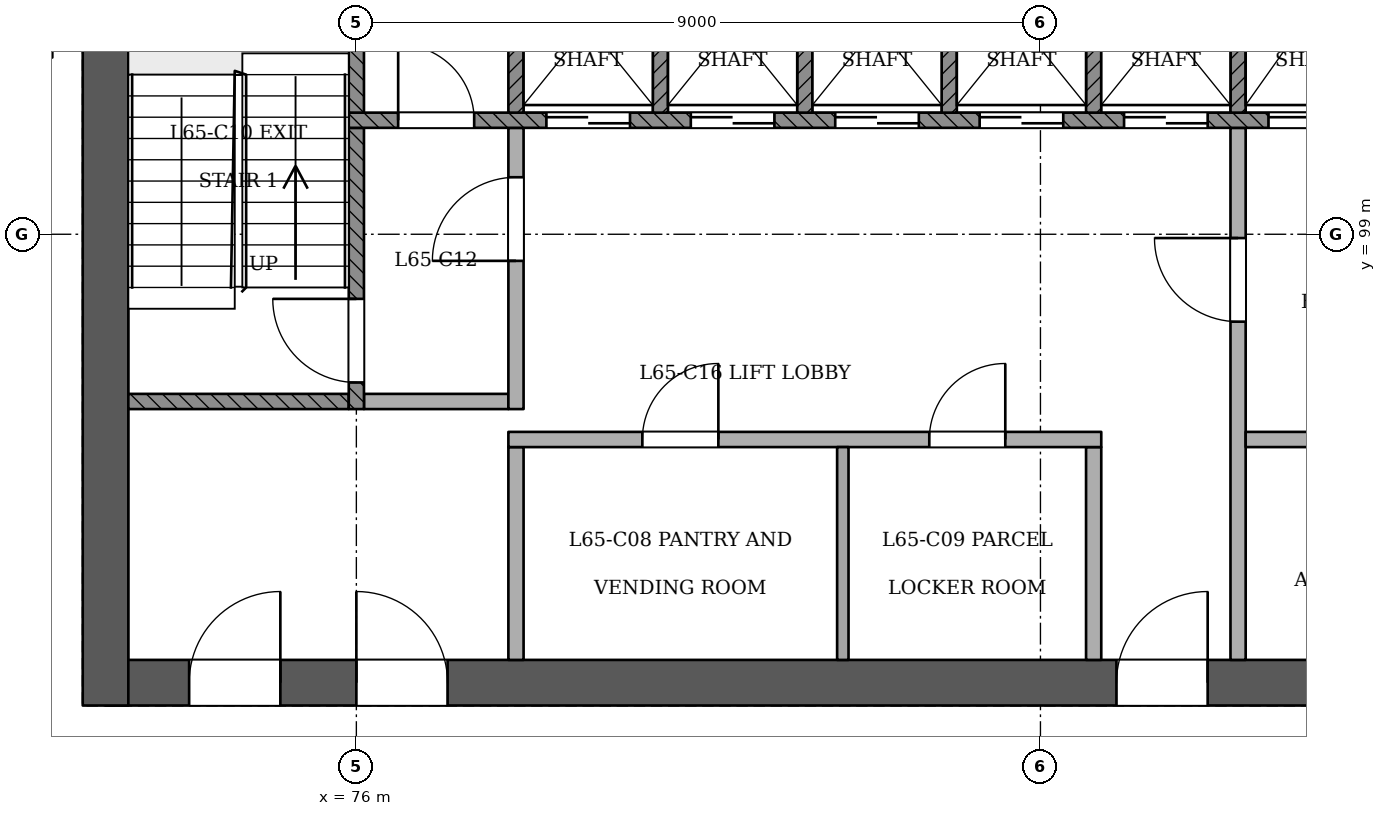
"""IFC4 building model, lengths in metres.
Left out: names, types, materials, properties, quantities, classifications, styles, units other than length and angle.
Written with IfcOpenShell. Run it as: python <this file> out.ifc"""

import sys

from ifc_helpers import new_model, si_unit, direction, frame, frame_2d, origin, place, context, subcontext, project, spatial, rectangle, extrude, element, fill, save


model = new_model("IFC4")
c1 = context("Model", 3, precision=1e-05, world=origin(), true_north=direction((0.0, 1.0)))
c2 = subcontext(c1, "Body", "Model", "MODEL_VIEW")
j1 = project(units=[si_unit("LENGTHUNIT", "METRE"), si_unit("PLANEANGLEUNIT", "RADIAN")], contexts=[c1])
p1 = place(None, origin())
s1 = spatial("IfcSite", under=j1, at=p1, CompositionType="ELEMENT")
p2 = place(p1, origin())
s2 = spatial("IfcBuilding", under=s1, at=p2, CompositionType="ELEMENT")
p3 = place(p2, frame((0.0, 0.0, 253.6)))
s3 = spatial("IfcBuildingStorey", under=s2, at=p3, CompositionType="ELEMENT", Elevation=253.6)
p4 = place(p3, frame((72.7, 93.1, 0.0), z_axis=(0.0, 0.0, 1.0), x_axis=(1.0, 0.0, 0.0)))
e1 = element("IfcWall", 1, at=p4, inside=s3, PredefinedType="SHEAR", context=c2, shape_type="SweptSolid", body=[
    extrude(rectangle(XDim=24.9, YDim=0.6, at=frame_2d((12.45, 0.0))), origin(), (0.0, 0.0, 1.0), 3.6),
])
p5 = place(p4, frame((1.1, 0.0, 0.0)))
e2 = element("IfcOpeningElement", 2, at=p5, cuts=e1, PredefinedType="OPENING", context=c2, shape_type="SweptSolid", body=[
    extrude(rectangle(XDim=1.2, YDim=2.1, at=frame_2d((0.6, 1.05))), frame((0.0, 0.311, 0.0), z_axis=(0.0, -1.0, 0.0), x_axis=(1.0, 0.0, 0.0)), (0.0, 0.0, 1.0), 0.621),
])
p6 = place(p4, frame((3.3, 0.0, 0.0)))
e3 = element("IfcOpeningElement", 3, at=p6, cuts=e1, PredefinedType="OPENING", context=c2, shape_type="SweptSolid", body=[
    extrude(rectangle(XDim=1.2, YDim=2.1, at=frame_2d((0.6, 1.05))), frame((0.0, 0.311, 0.0), z_axis=(0.0, -1.0, 0.0), x_axis=(1.0, 0.0, 0.0)), (0.0, 0.0, 1.0), 0.621),
])
p7 = place(p4, frame((13.3, 0.0, 0.0)))
e4 = element("IfcOpeningElement", 4, at=p7, cuts=e1, PredefinedType="OPENING", context=c2, shape_type="SweptSolid", body=[
    extrude(rectangle(XDim=1.2, YDim=2.1, at=frame_2d((0.6, 1.05))), frame((0.0, 0.311, 0.0), z_axis=(0.0, -1.0, 0.0), x_axis=(1.0, 0.0, 0.0)), (0.0, 0.0, 1.0), 0.621),
])
p8 = place(p4, frame((16.012, 0.0, 0.0)))
e5 = element("IfcOpeningElement", 5, at=p8, cuts=e1, PredefinedType="OPENING", context=c2, shape_type="SweptSolid", body=[
    extrude(rectangle(XDim=1.0, YDim=2.1, at=frame_2d((0.5, 1.05))), frame((0.0, 0.311, 0.0), z_axis=(0.0, -1.0, 0.0), x_axis=(1.0, 0.0, 0.0)), (0.0, 0.0, 1.0), 0.621),
])
p9 = place(p4, frame((19.9, 0.0, 0.0)))
e6 = element("IfcOpeningElement", 6, at=p9, cuts=e1, PredefinedType="OPENING", context=c2, shape_type="SweptSolid", body=[
    extrude(rectangle(XDim=1.0, YDim=2.1, at=frame_2d((0.5, 1.05))), frame((0.0, 0.311, 0.0), z_axis=(0.0, -1.0, 0.0), x_axis=(1.0, 0.0, 0.0)), (0.0, 0.0, 1.0), 0.621),
])
p10 = place(p4, frame((23.038, 0.0, 0.0)))
e7 = element("IfcOpeningElement", 7, at=p10, cuts=e1, PredefinedType="OPENING", context=c2, shape_type="SweptSolid", body=[
    extrude(rectangle(XDim=1.0, YDim=2.1, at=frame_2d((0.5, 1.05))), frame((0.0, 0.311, 0.0), z_axis=(0.0, -1.0, 0.0), x_axis=(1.0, 0.0, 0.0)), (0.0, 0.0, 1.0), 0.621),
])
p11 = place(p3, frame((72.7, 103.7, 0.0), z_axis=(0.0, 0.0, 1.0), x_axis=(0.0, -1.0, 0.0)))
e8 = element("IfcWall", 8, at=p11, inside=s3, PredefinedType="SHEAR", context=c2, shape_type="SweptSolid", body=[
    extrude(rectangle(XDim=10.9, YDim=0.6, at=frame_2d((5.45, 0.0))), origin(), (0.0, 0.0, 1.0), 3.6),
])
p12 = place(p3, frame((72.0, 101.4, 0.0), z_axis=(0.0, 0.0, 1.0), x_axis=(-1.0, 0.0, 0.0)))
e9 = element("IfcWall", 9, at=p12, inside=s3, PredefinedType="PARTITIONING", context=c2, shape_type="SweptSolid", body=[
    extrude(rectangle(XDim=1.8, YDim=0.15, at=frame_2d((0.9, 0.0))), origin(), (0.0, 0.0, 1.0), 3.2),
])
p13 = place(p12, frame((0.54, 0.0, 0.0)))
e10 = element("IfcOpeningElement", 10, at=p13, cuts=e9, PredefinedType="OPENING", context=c2, shape_type="SweptSolid", body=[
    extrude(rectangle(XDim=1.0, YDim=2.1, at=frame_2d((0.5, 1.05))), frame((0.0, 0.085, 0.0), z_axis=(0.0, -1.0, 0.0), x_axis=(1.0, 0.0, 0.0)), (0.0, 0.0, 1.0), 0.171),
])
p14 = place(p3, frame((78.1, 93.4, 0.0), z_axis=(0.0, 0.0, 1.0), x_axis=(0.0, 1.0, 0.0)))
e11 = element("IfcWall", 11, at=p14, inside=s3, PredefinedType="PARTITIONING", context=c2, shape_type="SweptSolid", body=[
    extrude(rectangle(XDim=2.8, YDim=0.2, at=frame_2d((1.4, 0.0))), origin(), (0.0, 0.0, 1.0), 3.2),
])
p15 = place(p3, frame((82.4, 93.4, 0.0), z_axis=(0.0, 0.0, 1.0), x_axis=(0.0, 1.0, 0.0)))
e12 = element("IfcWall", 12, at=p15, inside=s3, PredefinedType="PARTITIONING", context=c2, shape_type="SweptSolid", body=[
    extrude(rectangle(XDim=2.8, YDim=0.15, at=frame_2d((1.4, 0.0))), origin(), (0.0, 0.0, 1.0), 3.2),
])
p16 = place(p3, frame((85.7, 93.4, 0.0), z_axis=(0.0, 0.0, 1.0), x_axis=(0.0, 1.0, 0.0)))
e13 = element("IfcWall", 13, at=p16, inside=s3, PredefinedType="PARTITIONING", context=c2, shape_type="SweptSolid", body=[
    extrude(rectangle(XDim=2.8, YDim=0.2, at=frame_2d((1.4, 0.0))), origin(), (0.0, 0.0, 1.0), 3.2),
])
p17 = place(p3, frame((87.6, 93.4, 0.0), z_axis=(0.0, 0.0, 1.0), x_axis=(0.0, 1.0, 0.0)))
e14 = element("IfcWall", 14, at=p17, inside=s3, PredefinedType="PARTITIONING", context=c2, shape_type="SweptSolid", body=[
    extrude(rectangle(XDim=7.0, YDim=0.2, at=frame_2d((3.5, 0.0))), origin(), (0.0, 0.0, 1.0), 3.2),
])
p18 = place(p17, frame((4.45, 0.0, 0.0)))
e15 = element("IfcOpeningElement", 15, at=p18, cuts=e14, PredefinedType="OPENING", context=c2, shape_type="SweptSolid", body=[
    extrude(rectangle(XDim=1.1, YDim=2.1, at=frame_2d((0.55, 1.05))), frame((0.0, 0.11, 0.0), z_axis=(0.0, -1.0, 0.0), x_axis=(1.0, 0.0, 0.0)), (0.0, 0.0, 1.0), 0.221),
])
p19 = place(p3, frame((78.0, 96.3, 0.0), z_axis=(0.0, 0.0, 1.0), x_axis=(1.0, 0.0, 0.0)))
e16 = element("IfcWall", 16, at=p19, inside=s3, PredefinedType="PARTITIONING", context=c2, shape_type="SweptSolid", body=[
    extrude(rectangle(XDim=7.8, YDim=0.2, at=frame_2d((3.9, 0.0))), origin(), (0.0, 0.0, 1.0), 3.2),
])
p20 = place(p19, frame((1.762, 0.0, 0.0)))
e17 = element("IfcOpeningElement", 17, at=p20, cuts=e16, PredefinedType="OPENING", context=c2, shape_type="SweptSolid", body=[
    extrude(rectangle(XDim=1.0, YDim=2.1, at=frame_2d((0.5, 1.05))), frame((0.0, 0.11, 0.0), z_axis=(0.0, -1.0, 0.0), x_axis=(1.0, 0.0, 0.0)), (0.0, 0.0, 1.0), 0.221),
])
p21 = place(p19, frame((5.538, 0.0, 0.0)))
e18 = element("IfcOpeningElement", 18, at=p21, cuts=e16, PredefinedType="OPENING", context=c2, shape_type="SweptSolid", body=[
    extrude(rectangle(XDim=1.0, YDim=2.1, at=frame_2d((0.5, 1.05))), frame((0.0, 0.11, 0.0), z_axis=(0.0, -1.0, 0.0), x_axis=(1.0, 0.0, 0.0)), (0.0, 0.0, 1.0), 0.221),
])
p22 = place(p3, frame((87.7, 96.3, 0.0), z_axis=(0.0, 0.0, 1.0), x_axis=(1.0, 0.0, 0.0)))
e19 = element("IfcWall", 19, at=p22, inside=s3, PredefinedType="PARTITIONING", context=c2, shape_type="SweptSolid", body=[
    extrude(rectangle(XDim=3.6, YDim=0.2, at=frame_2d((1.8, 0.0))), origin(), (0.0, 0.0, 1.0), 3.2),
])
p23 = place(p3, frame((73.0, 96.8, 0.0), z_axis=(0.0, 0.0, 1.0), x_axis=(1.0, 0.0, 0.0)))
e20 = element("IfcWall", 20, at=p23, inside=s3, PredefinedType="SOLIDWALL", context=c2, shape_type="SweptSolid", body=[
    extrude(rectangle(XDim=2.9, YDim=0.2, at=frame_2d((1.45, 0.0))), origin(), (0.0, 0.0, 1.0), 3.2),
])
p24 = place(p3, frame((76.0, 96.7, 0.0), z_axis=(0.0, 0.0, 1.0), x_axis=(0.0, 1.0, 0.0)))
e21 = element("IfcWall", 21, at=p24, inside=s3, PredefinedType="SOLIDWALL", context=c2, shape_type="SweptSolid", body=[
    extrude(rectangle(XDim=3.7, YDim=0.2, at=frame_2d((1.85, 0.0))), origin(), (0.0, 0.0, 1.0), 3.2),
])
p25 = place(p24, frame((0.35, 0.0, 0.0)))
e22 = element("IfcOpeningElement", 22, at=p25, cuts=e21, PredefinedType="OPENING", context=c2, shape_type="SweptSolid", body=[
    extrude(rectangle(XDim=1.1, YDim=2.1, at=frame_2d((0.55, 1.05))), frame((0.0, 0.11, 0.0), z_axis=(0.0, -1.0, 0.0), x_axis=(1.0, 0.0, 0.0)), (0.0, 0.0, 1.0), 0.221),
])
p26 = place(p3, frame((76.1, 96.8, 0.0), z_axis=(0.0, 0.0, 1.0), x_axis=(1.0, 0.0, 0.0)))
e23 = element("IfcWall", 23, at=p26, inside=s3, PredefinedType="PARTITIONING", context=c2, shape_type="SweptSolid", body=[
    extrude(rectangle(XDim=1.9, YDim=0.2, at=frame_2d((0.95, 0.0))), origin(), (0.0, 0.0, 1.0), 3.2),
])
p27 = place(p3, frame((78.1, 96.7, 0.0), z_axis=(0.0, 0.0, 1.0), x_axis=(0.0, 1.0, 0.0)))
e24 = element("IfcWall", 24, at=p27, inside=s3, PredefinedType="PARTITIONING", context=c2, shape_type="SweptSolid", body=[
    extrude(rectangle(XDim=3.7, YDim=0.2, at=frame_2d((1.85, 0.0))), origin(), (0.0, 0.0, 1.0), 3.2),
])
p28 = place(p27, frame((1.95, 0.0, 0.0)))
e25 = element("IfcOpeningElement", 25, at=p28, cuts=e24, PredefinedType="OPENING", context=c2, shape_type="SweptSolid", body=[
    extrude(rectangle(XDim=1.1, YDim=2.1, at=frame_2d((0.55, 1.05))), frame((0.0, 0.11, 0.0), z_axis=(0.0, -1.0, 0.0), x_axis=(1.0, 0.0, 0.0)), (0.0, 0.0, 1.0), 0.221),
])
p29 = place(p3, frame((75.9, 100.5, 0.0), z_axis=(0.0, 0.0, 1.0), x_axis=(1.0, 0.0, 0.0)))
e26 = element("IfcWall", 26, at=p29, inside=s3, PredefinedType="SOLIDWALL", context=c2, shape_type="SweptSolid", body=[
    extrude(rectangle(XDim=18.2, YDim=0.2, at=frame_2d((9.1, 0.0))), origin(), (0.0, 0.0, 1.0), 3.2),
])
p30 = place(p29, frame((2.6, 0.0, 0.0)))
e27 = element("IfcOpeningElement", 27, at=p30, cuts=e26, PredefinedType="OPENING", context=c2, shape_type="SweptSolid", body=[
    extrude(rectangle(XDim=1.1, YDim=2.1, at=frame_2d((0.55, 1.05))), frame((0.0, 0.11, 0.0), z_axis=(0.0, -1.0, 0.0), x_axis=(1.0, 0.0, 0.0)), (0.0, 0.0, 1.0), 0.221),
])
p31 = place(p29, frame((4.5, 0.0, 0.0)))
e28 = element("IfcOpeningElement", 28, at=p31, cuts=e26, PredefinedType="OPENING", context=c2, shape_type="SweptSolid", body=[
    extrude(rectangle(XDim=1.1, YDim=2.1, at=frame_2d((0.55, 1.05))), frame((0.0, 0.11, 0.0), z_axis=(0.0, -1.0, 0.0), x_axis=(1.0, 0.0, 0.0)), (0.0, 0.0, 1.0), 0.221),
])
p32 = place(p29, frame((6.4, 0.0, 0.0)))
e29 = element("IfcOpeningElement", 29, at=p32, cuts=e26, PredefinedType="OPENING", context=c2, shape_type="SweptSolid", body=[
    extrude(rectangle(XDim=1.1, YDim=2.1, at=frame_2d((0.55, 1.05))), frame((0.0, 0.11, 0.0), z_axis=(0.0, -1.0, 0.0), x_axis=(1.0, 0.0, 0.0)), (0.0, 0.0, 1.0), 0.221),
])
p33 = place(p29, frame((8.3, 0.0, 0.0)))
e30 = element("IfcOpeningElement", 30, at=p33, cuts=e26, PredefinedType="OPENING", context=c2, shape_type="SweptSolid", body=[
    extrude(rectangle(XDim=1.1, YDim=2.1, at=frame_2d((0.55, 1.05))), frame((0.0, 0.11, 0.0), z_axis=(0.0, -1.0, 0.0), x_axis=(1.0, 0.0, 0.0)), (0.0, 0.0, 1.0), 0.221),
])
p34 = place(p29, frame((10.2, 0.0, 0.0)))
e31 = element("IfcOpeningElement", 31, at=p34, cuts=e26, PredefinedType="OPENING", context=c2, shape_type="SweptSolid", body=[
    extrude(rectangle(XDim=1.1, YDim=2.1, at=frame_2d((0.55, 1.05))), frame((0.0, 0.11, 0.0), z_axis=(0.0, -1.0, 0.0), x_axis=(1.0, 0.0, 0.0)), (0.0, 0.0, 1.0), 0.221),
])
p35 = place(p29, frame((12.1, 0.0, 0.0)))
e32 = element("IfcOpeningElement", 32, at=p35, cuts=e26, PredefinedType="OPENING", context=c2, shape_type="SweptSolid", body=[
    extrude(rectangle(XDim=1.1, YDim=2.1, at=frame_2d((0.55, 1.05))), frame((0.0, 0.11, 0.0), z_axis=(0.0, -1.0, 0.0), x_axis=(1.0, 0.0, 0.0)), (0.0, 0.0, 1.0), 0.221),
])
p36 = place(p29, frame((14.0, 0.0, 0.0)))
e33 = element("IfcOpeningElement", 33, at=p36, cuts=e26, PredefinedType="OPENING", context=c2, shape_type="SweptSolid", body=[
    extrude(rectangle(XDim=1.1, YDim=2.1, at=frame_2d((0.55, 1.05))), frame((0.0, 0.11, 0.0), z_axis=(0.0, -1.0, 0.0), x_axis=(1.0, 0.0, 0.0)), (0.0, 0.0, 1.0), 0.221),
])
p37 = place(p29, frame((0.65, 0.0, 0.0)))
e34 = element("IfcOpeningElement", 34, at=p37, cuts=e26, PredefinedType="OPENING", context=c2, shape_type="SweptSolid", body=[
    extrude(rectangle(XDim=1.0, YDim=2.1, at=frame_2d((0.5, 1.05))), frame((0.0, 0.11, 0.0), z_axis=(0.0, -1.0, 0.0), x_axis=(1.0, 0.0, 0.0)), (0.0, 0.0, 1.0), 0.221),
])
p38 = place(p29, frame((16.3, 0.0, 0.0)))
e35 = element("IfcOpeningElement", 35, at=p38, cuts=e26, PredefinedType="OPENING", context=c2, shape_type="SweptSolid", body=[
    extrude(rectangle(XDim=1.0, YDim=2.1, at=frame_2d((0.5, 1.05))), frame((0.0, 0.11, 0.0), z_axis=(0.0, -1.0, 0.0), x_axis=(1.0, 0.0, 0.0)), (0.0, 0.0, 1.0), 0.221),
])
for number, where, z_axis, x_axis in (
    (36, (76.0, 100.6, 0.0), (0.0, 0.0, 1.0), (0.0, 1.0, 0.0)),
    (37, (78.1, 100.6, 0.0), (0.0, 0.0, 1.0), (0.0, 1.0, 0.0)),
    (38, (80.0, 100.6, 0.0), (0.0, 0.0, 1.0), (0.0, 1.0, 0.0)),
    (39, (81.9, 100.6, 0.0), (0.0, 0.0, 1.0), (0.0, 1.0, 0.0)),
    (40, (83.8, 100.6, 0.0), (0.0, 0.0, 1.0), (0.0, 1.0, 0.0)),
    (41, (85.7, 100.6, 0.0), (0.0, 0.0, 1.0), (0.0, 1.0, 0.0)),
    (42, (87.6, 100.6, 0.0), (0.0, 0.0, 1.0), (0.0, 1.0, 0.0)),
):
    element("IfcWall", number, at=place(p3, frame(where, z_axis=z_axis, x_axis=x_axis)), inside=s3, PredefinedType="SOLIDWALL", context=c2, shape_type="SweptSolid", body=[
        extrude(rectangle(XDim=2.8, YDim=0.2, at=frame_2d((1.4, 0.0))), origin(), (0.0, 0.0, 1.0), 3.2),
    ])
p39 = place(p30, origin())
e43 = element("IfcDoor", 43, at=p39, inside=s3, OperationType="SLIDING_TO_RIGHT", PredefinedType="NOTDEFINED", context=c2, shape_type="SweptSolid", body=[
    extrude(rectangle(XDim=1.1, YDim=2.1, at=frame_2d((0.55, 1.05))), frame((0.0, 0.025, 0.0), z_axis=(0.0, -1.0, 0.0), x_axis=(1.0, 0.0, 0.0)), (0.0, 0.0, 1.0), 0.05),
])
fill(e27, e43)
p40 = place(p31, origin())
e44 = element("IfcDoor", 44, at=p40, inside=s3, OperationType="SLIDING_TO_LEFT", PredefinedType="NOTDEFINED", context=c2, shape_type="SweptSolid", body=[
    extrude(rectangle(XDim=1.1, YDim=2.1, at=frame_2d((0.55, 1.05))), frame((0.0, 0.025, 0.0), z_axis=(0.0, -1.0, 0.0), x_axis=(1.0, 0.0, 0.0)), (0.0, 0.0, 1.0), 0.05),
])
fill(e28, e44)
p41 = place(p32, origin())
e45 = element("IfcDoor", 45, at=p41, inside=s3, OperationType="SLIDING_TO_RIGHT", PredefinedType="NOTDEFINED", context=c2, shape_type="SweptSolid", body=[
    extrude(rectangle(XDim=1.1, YDim=2.1, at=frame_2d((0.55, 1.05))), frame((0.0, 0.025, 0.0), z_axis=(0.0, -1.0, 0.0), x_axis=(1.0, 0.0, 0.0)), (0.0, 0.0, 1.0), 0.05),
])
fill(e29, e45)
p42 = place(p33, origin())
e46 = element("IfcDoor", 46, at=p42, inside=s3, OperationType="SLIDING_TO_LEFT", PredefinedType="NOTDEFINED", context=c2, shape_type="SweptSolid", body=[
    extrude(rectangle(XDim=1.1, YDim=2.1, at=frame_2d((0.55, 1.05))), frame((0.0, 0.025, 0.0), z_axis=(0.0, -1.0, 0.0), x_axis=(1.0, 0.0, 0.0)), (0.0, 0.0, 1.0), 0.05),
])
fill(e30, e46)
p43 = place(p34, origin())
e47 = element("IfcDoor", 47, at=p43, inside=s3, OperationType="SLIDING_TO_RIGHT", PredefinedType="NOTDEFINED", context=c2, shape_type="SweptSolid", body=[
    extrude(rectangle(XDim=1.1, YDim=2.1, at=frame_2d((0.55, 1.05))), frame((0.0, 0.025, 0.0), z_axis=(0.0, -1.0, 0.0), x_axis=(1.0, 0.0, 0.0)), (0.0, 0.0, 1.0), 0.05),
])
fill(e31, e47)
p44 = place(p35, origin())
e48 = element("IfcDoor", 48, at=p44, inside=s3, OperationType="SLIDING_TO_RIGHT", PredefinedType="NOTDEFINED", context=c2, shape_type="SweptSolid", body=[
    extrude(rectangle(XDim=1.1, YDim=2.1, at=frame_2d((0.55, 1.05))), frame((0.0, 0.025, 0.0), z_axis=(0.0, -1.0, 0.0), x_axis=(1.0, 0.0, 0.0)), (0.0, 0.0, 1.0), 0.05),
])
fill(e32, e48)
p45 = place(p25, origin())
e49 = element("IfcDoor", 49, at=p45, inside=s3, OperationType="SINGLE_SWING_RIGHT", PredefinedType="NOTDEFINED", context=c2, shape_type="SweptSolid", body=[
    extrude(rectangle(XDim=1.1, YDim=2.1, at=frame_2d((0.55, 1.05))), frame((0.0, 0.025, 0.0), z_axis=(0.0, -1.0, 0.0), x_axis=(1.0, 0.0, 0.0)), (0.0, 0.0, 1.0), 0.05),
])
fill(e22, e49)
p46 = place(p28, origin())
e50 = element("IfcDoor", 50, at=p46, inside=s3, OperationType="SINGLE_SWING_LEFT", PredefinedType="NOTDEFINED", context=c2, shape_type="SweptSolid", body=[
    extrude(rectangle(XDim=1.1, YDim=2.1, at=frame_2d((0.55, 1.05))), frame((0.0, 0.025, 0.0), z_axis=(0.0, -1.0, 0.0), x_axis=(1.0, 0.0, 0.0)), (0.0, 0.0, 1.0), 0.05),
])
fill(e25, e50)
p47 = place(p18, origin())
e51 = element("IfcDoor", 51, at=p47, inside=s3, OperationType="SINGLE_SWING_RIGHT", PredefinedType="NOTDEFINED", context=c2, shape_type="SweptSolid", body=[
    extrude(rectangle(XDim=1.1, YDim=2.1, at=frame_2d((0.55, 1.05))), frame((0.0, 0.025, 0.0), z_axis=(0.0, -1.0, 0.0), x_axis=(1.0, 0.0, 0.0)), (0.0, 0.0, 1.0), 0.05),
])
fill(e15, e51)
p48 = place(p5, origin())
e52 = element("IfcDoor", 52, at=p48, inside=s3, OperationType="SINGLE_SWING_RIGHT", PredefinedType="NOTDEFINED", context=c2, shape_type="SweptSolid", body=[
    extrude(rectangle(XDim=1.2, YDim=2.1, at=frame_2d((0.6, 1.05))), frame((0.0, 0.025, 0.0), z_axis=(0.0, -1.0, 0.0), x_axis=(1.0, 0.0, 0.0)), (0.0, 0.0, 1.0), 0.05),
])
fill(e2, e52)
p49 = place(p6, origin())
e53 = element("IfcDoor", 53, at=p49, inside=s3, OperationType="SINGLE_SWING_LEFT", PredefinedType="NOTDEFINED", context=c2, shape_type="SweptSolid", body=[
    extrude(rectangle(XDim=1.2, YDim=2.1, at=frame_2d((0.6, 1.05))), frame((0.0, 0.025, 0.0), z_axis=(0.0, -1.0, 0.0), x_axis=(1.0, 0.0, 0.0)), (0.0, 0.0, 1.0), 0.05),
])
fill(e3, e53)
p50 = place(p7, origin())
e54 = element("IfcDoor", 54, at=p50, inside=s3, OperationType="SINGLE_SWING_RIGHT", PredefinedType="NOTDEFINED", context=c2, shape_type="SweptSolid", body=[
    extrude(rectangle(XDim=1.2, YDim=2.1, at=frame_2d((0.6, 1.05))), frame((0.0, 0.025, 0.0), z_axis=(0.0, -1.0, 0.0), x_axis=(1.0, 0.0, 0.0)), (0.0, 0.0, 1.0), 0.05),
])
fill(e4, e54)
p51 = place(p37, origin())
e55 = element("IfcDoor", 55, at=p51, inside=s3, OperationType="SINGLE_SWING_LEFT", PredefinedType="NOTDEFINED", context=c2, shape_type="SweptSolid", body=[
    extrude(rectangle(XDim=1.0, YDim=2.1, at=frame_2d((0.5, 1.05))), frame((0.0, 0.025, 0.0), z_axis=(0.0, -1.0, 0.0), x_axis=(1.0, 0.0, 0.0)), (0.0, 0.0, 1.0), 0.05),
])
fill(e34, e55)
p52 = place(p20, origin())
e56 = element("IfcDoor", 56, at=p52, inside=s3, OperationType="SINGLE_SWING_RIGHT", PredefinedType="NOTDEFINED", context=c2, shape_type="SweptSolid", body=[
    extrude(rectangle(XDim=1.0, YDim=2.1, at=frame_2d((0.5, 1.05))), frame((0.0, 0.025, 0.0), z_axis=(0.0, -1.0, 0.0), x_axis=(1.0, 0.0, 0.0)), (0.0, 0.0, 1.0), 0.05),
])
fill(e17, e56)
p53 = place(p21, origin())
e57 = element("IfcDoor", 57, at=p53, inside=s3, OperationType="SINGLE_SWING_RIGHT", PredefinedType="NOTDEFINED", context=c2, shape_type="SweptSolid", body=[
    extrude(rectangle(XDim=1.0, YDim=2.1, at=frame_2d((0.5, 1.05))), frame((0.0, 0.025, 0.0), z_axis=(0.0, -1.0, 0.0), x_axis=(1.0, 0.0, 0.0)), (0.0, 0.0, 1.0), 0.05),
])
fill(e18, e57)
save(model, sys.argv[1])
